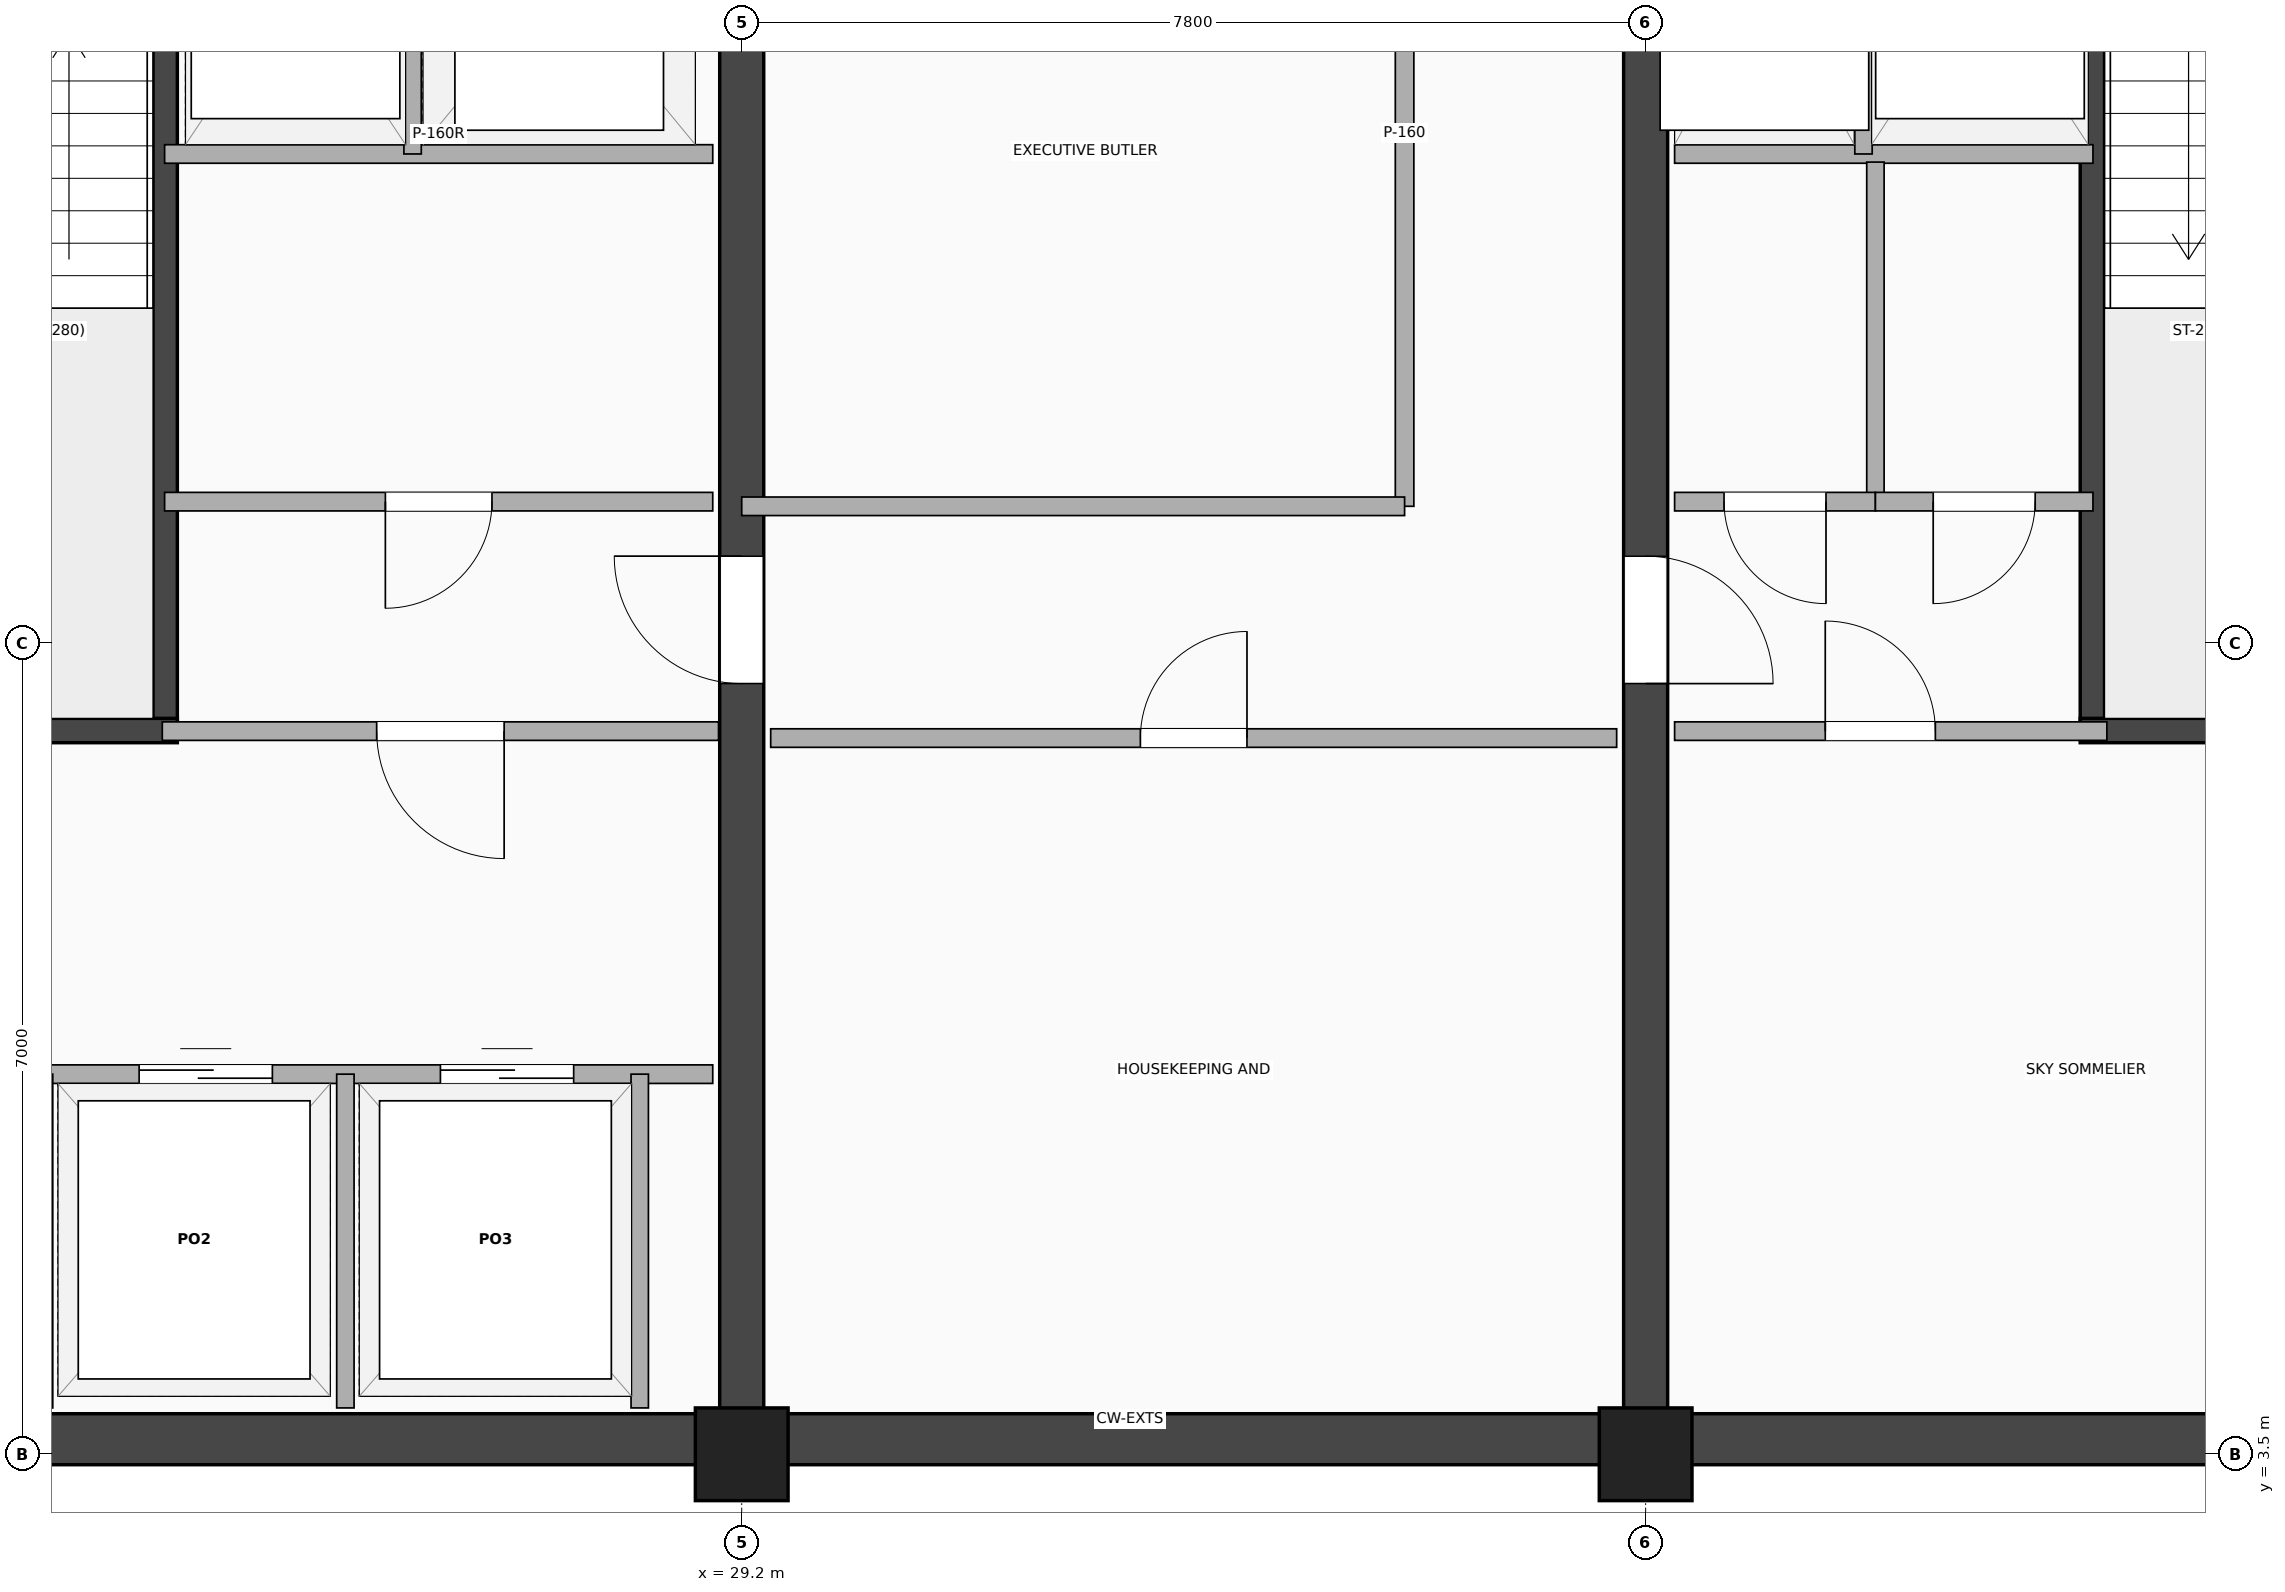
"""IFC4 building model, lengths in metres.
Left out: names, types, materials, properties, quantities, classifications, styles, units other than length and angle.
Written with IfcOpenShell. Run it as: python <this file> out.ifc"""

import sys

from ifc_helpers import new_model, si_unit, direction, frame, frame_2d, origin, origin_2d, place, context, subcontext, project, spatial, rectangle, extrude, element, fill, save


model = new_model("IFC4")
c1 = context("Model", 3, precision=1e-05, world=origin(), true_north=direction((0.0, 1.0)))
c2 = subcontext(c1, "Body", "Model", "MODEL_VIEW")
j1 = project(units=[si_unit("LENGTHUNIT", "METRE"), si_unit("PLANEANGLEUNIT", "RADIAN")], contexts=[c1])
p1 = place(None, origin())
s1 = spatial("IfcSite", under=j1, at=p1, CompositionType="ELEMENT")
p2 = place(p1, origin())
s2 = spatial("IfcBuilding", under=s1, at=p2, CompositionType="ELEMENT")
p3 = place(p2, frame((0.0, 0.0, 289.9)))
s3 = spatial("IfcBuildingStorey", under=s2, at=p3, CompositionType="ELEMENT", Elevation=289.9)
p4 = place(p3, frame((20.3, 3.63, 0.0), z_axis=(0.0, 0.0, 1.0), x_axis=(1.0, 0.0, 0.0)))
e1 = element("IfcWall", 1, at=p4, inside=s3, PredefinedType="SHEAR", context=c2, shape_type="SweptSolid", body=[
    extrude(rectangle(XDim=24.5, YDim=0.44, at=frame_2d((12.25, 0.0))), origin(), (0.0, 0.0, 1.0), 3.76),
])
p5 = place(p3, frame((29.2, 3.5, 0.0), z_axis=(0.0, 0.0, 1.0), x_axis=(0.0, 1.0, 0.0)))
e2 = element("IfcWall", 2, at=p5, inside=s3, PredefinedType="SHEAR", context=c2, shape_type="SweptSolid", body=[
    extrude(rectangle(XDim=14.95, YDim=0.38, at=frame_2d((7.475, 0.0))), origin(), (0.0, 0.0, 1.0), 3.76),
])
p6 = place(p5, frame((7.75, 0.0, 0.0), z_axis=(0.0, 0.0, 1.0), x_axis=(-1.0, 0.0, 0.0)))
e3 = element("IfcOpeningElement", 3, at=p6, cuts=e2, PredefinedType="OPENING", context=c2, shape_type="SweptSolid", body=[
    extrude(rectangle(XDim=1.1, YDim=2.15, at=frame_2d((0.55, 1.075))), frame((0.0, 0.2, 0.0), z_axis=(0.0, -1.0, 0.0), x_axis=(1.0, 0.0, 0.0)), (0.0, 0.0, 1.0), 0.4),
])
p7 = place(p3, frame((37.0, 3.5, 0.0), z_axis=(0.0, 0.0, 1.0), x_axis=(0.0, 1.0, 0.0)))
e4 = element("IfcWall", 4, at=p7, inside=s3, PredefinedType="SHEAR", context=c2, shape_type="SweptSolid", body=[
    extrude(rectangle(XDim=14.95, YDim=0.38, at=frame_2d((7.475, 0.0))), origin(), (0.0, 0.0, 1.0), 3.76),
])
p8 = place(p7, frame((6.65, 0.0, 0.0)))
e5 = element("IfcOpeningElement", 5, at=p8, cuts=e4, PredefinedType="OPENING", context=c2, shape_type="SweptSolid", body=[
    extrude(rectangle(XDim=1.1, YDim=2.15, at=frame_2d((0.55, 1.075))), frame((0.0, 0.2, 0.0), z_axis=(0.0, -1.0, 0.0), x_axis=(1.0, 0.0, 0.0)), (0.0, 0.0, 1.0), 0.4),
])
p9 = place(p3, frame((24.225, 9.745, 0.0), z_axis=(0.0, 0.0, 1.0), x_axis=(0.0, 1.0, 0.0)))
e6 = element("IfcWall", 6, at=p9, inside=s3, PredefinedType="SHEAR", context=c2, shape_type="SweptSolid", body=[
    extrude(rectangle(XDim=8.01, YDim=0.21, at=frame_2d((4.005, 0.0))), origin(), (0.0, 0.0, 1.0), 3.76),
])
p10 = place(p3, frame((20.67, 9.745, 0.0), z_axis=(0.0, 0.0, 1.0), x_axis=(1.0, 0.0, 0.0)))
e7 = element("IfcWall", 7, at=p10, inside=s3, PredefinedType="SHEAR", context=c2, shape_type="SweptSolid", body=[
    extrude(rectangle(XDim=3.66, YDim=0.21, at=frame_2d((1.83, 0.0))), origin(), (0.0, 0.0, 1.0), 3.76),
])
p11 = place(p3, frame((40.855, 9.745, 0.0), z_axis=(0.0, 0.0, 1.0), x_axis=(0.0, 1.0, 0.0)))
e8 = element("IfcWall", 8, at=p11, inside=s3, PredefinedType="SHEAR", context=c2, shape_type="SweptSolid", body=[
    extrude(rectangle(XDim=8.01, YDim=0.21, at=frame_2d((4.005, 0.0))), origin(), (0.0, 0.0, 1.0), 3.76),
])
p12 = place(p3, frame((40.75, 9.745, 0.0), z_axis=(0.0, 0.0, 1.0), x_axis=(1.0, 0.0, 0.0)))
e9 = element("IfcWall", 9, at=p12, inside=s3, PredefinedType="SHEAR", context=c2, shape_type="SweptSolid", body=[
    extrude(rectangle(XDim=3.66, YDim=0.21, at=frame_2d((1.83, 0.0))), origin(), (0.0, 0.0, 1.0), 3.76),
])
for number, where, z_axis, x_axis in (
    (10, (29.2, 3.5, -0.24), (0.0, 0.0, 1.0), (1.0, 0.0, 0.0)),
    (11, (37.0, 3.5, -0.24), (0.0, 0.0, 1.0), (1.0, 0.0, 0.0)),
):
    element("IfcColumn", number, at=place(p3, frame(where, z_axis=z_axis, x_axis=x_axis)), inside=s3, PredefinedType="COLUMN", context=c2, shape_type="SweptSolid", body=[
        extrude(rectangle(XDim=0.8, YDim=0.8, at=origin_2d()), origin(), (0.0, 0.0, 1.0), 4.0),
    ])
p13 = place(p3, frame((24.22, 14.72, 0.0), z_axis=(0.0, 0.0, 1.0), x_axis=(1.0, 0.0, 0.0)))
e12 = element("IfcWall", 12, at=p13, inside=s3, PredefinedType="PARTITIONING", context=c2, shape_type="SweptSolid", body=[
    extrude(rectangle(XDim=4.73, YDim=0.16, at=frame_2d((2.365, 0.0))), origin(), (0.0, 0.0, 1.0), 3.76),
])
p14 = place(p3, frame((26.36, 14.72, 0.0), z_axis=(0.0, 0.0, 1.0), x_axis=(0.0, 1.0, 0.0)))
e13 = element("IfcWall", 13, at=p14, inside=s3, PredefinedType="PARTITIONING", context=c2, shape_type="SweptSolid", body=[
    extrude(rectangle(XDim=3.04, YDim=0.15, at=frame_2d((1.52, 0.0))), origin(), (0.0, 0.0, 1.0), 3.76),
])
p15 = place(p3, frame((37.25, 14.72, 0.0), z_axis=(0.0, 0.0, 1.0), x_axis=(1.0, 0.0, 0.0)))
e14 = element("IfcWall", 14, at=p15, inside=s3, PredefinedType="PARTITIONING", context=c2, shape_type="SweptSolid", body=[
    extrude(rectangle(XDim=3.61, YDim=0.16, at=frame_2d((1.805, 0.0))), origin(), (0.0, 0.0, 1.0), 3.76),
])
p16 = place(p3, frame((38.88, 14.72, 0.0), z_axis=(0.0, 0.0, 1.0), x_axis=(0.0, 1.0, 0.0)))
e15 = element("IfcWall", 15, at=p16, inside=s3, PredefinedType="PARTITIONING", context=c2, shape_type="SweptSolid", body=[
    extrude(rectangle(XDim=3.04, YDim=0.15, at=frame_2d((1.52, 0.0))), origin(), (0.0, 0.0, 1.0), 3.76),
])
p17 = place(p3, frame((24.22, 11.72, 0.0), z_axis=(0.0, 0.0, 1.0), x_axis=(1.0, 0.0, 0.0)))
e16 = element("IfcWall", 16, at=p17, inside=s3, PredefinedType="PARTITIONING", context=c2, shape_type="SweptSolid", body=[
    extrude(rectangle(XDim=4.73, YDim=0.16, at=frame_2d((2.365, 0.0))), origin(), (0.0, 0.0, 1.0), 3.76),
])
p18 = place(p17, frame((1.905, 0.0, 0.0)))
e17 = element("IfcOpeningElement", 17, at=p18, cuts=e16, PredefinedType="OPENING", context=c2, shape_type="SweptSolid", body=[
    extrude(rectangle(XDim=0.92, YDim=2.08, at=frame_2d((0.46, 1.04))), frame((0.0, 0.09, 0.0), z_axis=(0.0, -1.0, 0.0), x_axis=(1.0, 0.0, 0.0)), (0.0, 0.0, 1.0), 0.18),
])
p19 = place(p3, frame((38.983, 11.72, 0.0), z_axis=(0.0, 0.0, 1.0), x_axis=(0.0, 1.0, 0.0)))
e18 = element("IfcWall", 18, at=p19, inside=s3, PredefinedType="PARTITIONING", context=c2, shape_type="SweptSolid", body=[
    extrude(rectangle(XDim=2.93, YDim=0.15, at=frame_2d((1.465, 0.0))), origin(), (0.0, 0.0, 1.0), 3.76),
])
p20 = place(p3, frame((37.25, 11.72, 0.0), z_axis=(0.0, 0.0, 1.0), x_axis=(1.0, 0.0, 0.0)))
e19 = element("IfcWall", 19, at=p20, inside=s3, PredefinedType="PARTITIONING", context=c2, shape_type="SweptSolid", body=[
    extrude(rectangle(XDim=1.733, YDim=0.16, at=frame_2d((0.866, 0.0))), origin(), (0.0, 0.0, 1.0), 3.76),
])
p21 = place(p20, frame((0.427, 0.0, 0.0)))
e20 = element("IfcOpeningElement", 20, at=p21, cuts=e19, PredefinedType="OPENING", context=c2, shape_type="SweptSolid", body=[
    extrude(rectangle(XDim=0.88, YDim=2.08, at=frame_2d((0.44, 1.04))), frame((0.0, 0.09, 0.0), z_axis=(0.0, -1.0, 0.0), x_axis=(1.0, 0.0, 0.0)), (0.0, 0.0, 1.0), 0.18),
])
p22 = place(p3, frame((38.983, 11.72, 0.0), z_axis=(0.0, 0.0, 1.0), x_axis=(1.0, 0.0, 0.0)))
e21 = element("IfcWall", 21, at=p22, inside=s3, PredefinedType="PARTITIONING", context=c2, shape_type="SweptSolid", body=[
    extrude(rectangle(XDim=1.877, YDim=0.16, at=frame_2d((0.938, 0.0))), origin(), (0.0, 0.0, 1.0), 3.76),
])
p23 = place(p22, frame((0.499, 0.0, 0.0)))
e22 = element("IfcOpeningElement", 22, at=p23, cuts=e21, PredefinedType="OPENING", context=c2, shape_type="SweptSolid", body=[
    extrude(rectangle(XDim=0.88, YDim=2.08, at=frame_2d((0.44, 1.04))), frame((0.0, 0.09, 0.0), z_axis=(0.0, -1.0, 0.0), x_axis=(1.0, 0.0, 0.0)), (0.0, 0.0, 1.0), 0.18),
])
p24 = place(p3, frame((20.65, 6.78, 0.0), z_axis=(0.0, 0.0, 1.0), x_axis=(1.0, 0.0, 0.0)))
e23 = element("IfcWall", 23, at=p24, inside=s3, PredefinedType="PARTITIONING", context=c2, shape_type="SweptSolid", body=[
    extrude(rectangle(XDim=8.3, YDim=0.16, at=frame_2d((4.15, 0.0))), origin(), (0.0, 0.0, 1.0), 3.05),
])
p25 = place(p24, frame((0.75, 0.0, 0.0)))
e24 = element("IfcOpeningElement", 24, at=p25, cuts=e23, PredefinedType="OPENING", context=c2, shape_type="SweptSolid", body=[
    extrude(rectangle(XDim=1.15, YDim=2.2, at=frame_2d((0.575, 1.1))), frame((0.0, 0.09, 0.0), z_axis=(0.0, -1.0, 0.0), x_axis=(1.0, 0.0, 0.0)), (0.0, 0.0, 1.0), 0.18),
])
p26 = place(p24, frame((3.35, 0.0, 0.0)))
e25 = element("IfcOpeningElement", 25, at=p26, cuts=e23, PredefinedType="OPENING", context=c2, shape_type="SweptSolid", body=[
    extrude(rectangle(XDim=1.15, YDim=2.2, at=frame_2d((0.575, 1.1))), frame((0.0, 0.09, 0.0), z_axis=(0.0, -1.0, 0.0), x_axis=(1.0, 0.0, 0.0)), (0.0, 0.0, 1.0), 0.18),
])
p27 = place(p24, frame((5.95, 0.0, 0.0)))
e26 = element("IfcOpeningElement", 26, at=p27, cuts=e23, PredefinedType="OPENING", context=c2, shape_type="SweptSolid", body=[
    extrude(rectangle(XDim=1.15, YDim=2.2, at=frame_2d((0.575, 1.1))), frame((0.0, 0.09, 0.0), z_axis=(0.0, -1.0, 0.0), x_axis=(1.0, 0.0, 0.0)), (0.0, 0.0, 1.0), 0.18),
])
for number, where, z_axis, x_axis in (
    (27, (23.18, 3.9, 0.0), (0.0, 0.0, 1.0), (0.0, 1.0, 0.0)),
    (28, (25.78, 3.9, 0.0), (0.0, 0.0, 1.0), (0.0, 1.0, 0.0)),
    (29, (28.32, 3.9, 0.0), (0.0, 0.0, 1.0), (0.0, 1.0, 0.0)),
):
    element("IfcWall", number, at=place(p3, frame(where, z_axis=z_axis, x_axis=x_axis)), inside=s3, PredefinedType="PARTITIONING", context=c2, shape_type="SweptSolid", body=[
        extrude(rectangle(XDim=2.88, YDim=0.15, at=frame_2d((1.44, 0.0))), origin(), (0.0, 0.0, 1.0), 3.76),
    ])
p28 = place(p3, frame((24.2, 9.74, 0.0), z_axis=(0.0, 0.0, 1.0), x_axis=(1.0, 0.0, 0.0)))
e30 = element("IfcWall", 30, at=p28, inside=s3, PredefinedType="PARTITIONING", context=c2, shape_type="SweptSolid", body=[
    extrude(rectangle(XDim=4.8, YDim=0.16, at=frame_2d((2.4, 0.0))), origin(), (0.0, 0.0, 1.0), 3.76),
])
p29 = place(p28, frame((1.85, 0.0, 0.0)))
e31 = element("IfcOpeningElement", 31, at=p29, cuts=e30, PredefinedType="OPENING", context=c2, shape_type="SweptSolid", body=[
    extrude(rectangle(XDim=1.1, YDim=2.15, at=frame_2d((0.55, 1.075))), frame((0.0, 0.09, 0.0), z_axis=(0.0, -1.0, 0.0), x_axis=(1.0, 0.0, 0.0)), (0.0, 0.0, 1.0), 0.18),
])
p30 = place(p3, frame((37.25, 9.74, 0.0), z_axis=(0.0, 0.0, 1.0), x_axis=(1.0, 0.0, 0.0)))
e32 = element("IfcWall", 32, at=p30, inside=s3, PredefinedType="PARTITIONING", context=c2, shape_type="SweptSolid", body=[
    extrude(rectangle(XDim=3.73, YDim=0.16, at=frame_2d((1.865, 0.0))), origin(), (0.0, 0.0, 1.0), 3.76),
])
p31 = place(p30, frame((2.25, 0.0, 0.0), z_axis=(0.0, 0.0, 1.0), x_axis=(-1.0, 0.0, 0.0)))
e33 = element("IfcOpeningElement", 33, at=p31, cuts=e32, PredefinedType="OPENING", context=c2, shape_type="SweptSolid", body=[
    extrude(rectangle(XDim=0.95, YDim=2.15, at=frame_2d((0.475, 1.075))), frame((0.0, 0.09, 0.0), z_axis=(0.0, -1.0, 0.0), x_axis=(1.0, 0.0, 0.0)), (0.0, 0.0, 1.0), 0.18),
])
p32 = place(p3, frame((34.92, 11.68, 0.0), z_axis=(0.0, 0.0, 1.0), x_axis=(0.0, 1.0, 0.0)))
e34 = element("IfcWall", 34, at=p32, inside=s3, PredefinedType="PARTITIONING", context=c2, shape_type="SweptSolid", body=[
    extrude(rectangle(XDim=6.1, YDim=0.16, at=frame_2d((3.05, 0.0))), origin(), (0.0, 0.0, 1.0), 3.76),
])
p33 = place(p3, frame((29.45, 9.68, 0.0), z_axis=(0.0, 0.0, 1.0), x_axis=(1.0, 0.0, 0.0)))
e35 = element("IfcWall", 35, at=p33, inside=s3, PredefinedType="PARTITIONING", context=c2, shape_type="SweptSolid", body=[
    extrude(rectangle(XDim=7.3, YDim=0.16, at=frame_2d((3.65, 0.0))), origin(), (0.0, 0.0, 1.0), 3.76),
])
p34 = place(p33, frame((4.11, 0.0, 0.0), z_axis=(0.0, 0.0, 1.0), x_axis=(-1.0, 0.0, 0.0)))
e36 = element("IfcOpeningElement", 36, at=p34, cuts=e35, PredefinedType="OPENING", context=c2, shape_type="SweptSolid", body=[
    extrude(rectangle(XDim=0.92, YDim=2.08, at=frame_2d((0.46, 1.04))), frame((0.0, 0.09, 0.0), z_axis=(0.0, -1.0, 0.0), x_axis=(1.0, 0.0, 0.0)), (0.0, 0.0, 1.0), 0.18),
])
p35 = place(p3, frame((29.2, 11.68, 0.0), z_axis=(0.0, 0.0, 1.0), x_axis=(1.0, 0.0, 0.0)))
e37 = element("IfcWall", 37, at=p35, inside=s3, PredefinedType="PARTITIONING", context=c2, shape_type="SweptSolid", body=[
    extrude(rectangle(XDim=5.72, YDim=0.16, at=frame_2d((2.86, 0.0))), origin(), (0.0, 0.0, 1.0), 3.76),
])
p36 = place(p6, origin())
e38 = element("IfcDoor", 38, at=p36, inside=s3, OperationType="SINGLE_SWING_RIGHT", PredefinedType="DOOR", context=c2, shape_type="SweptSolid", body=[
    extrude(rectangle(XDim=1.1, YDim=2.15, at=frame_2d((0.55, 1.075))), frame((0.0, 0.025, 0.0), z_axis=(0.0, -1.0, 0.0), x_axis=(1.0, 0.0, 0.0)), (0.0, 0.0, 1.0), 0.05),
])
fill(e3, e38)
p37 = place(p8, origin())
e39 = element("IfcDoor", 39, at=p37, inside=s3, OperationType="SINGLE_SWING_LEFT", PredefinedType="DOOR", context=c2, shape_type="SweptSolid", body=[
    extrude(rectangle(XDim=1.1, YDim=2.15, at=frame_2d((0.55, 1.075))), frame((0.0, 0.025, 0.0), z_axis=(0.0, -1.0, 0.0), x_axis=(1.0, 0.0, 0.0)), (0.0, 0.0, 1.0), 0.05),
])
fill(e5, e39)
p38 = place(p18, origin())
e40 = element("IfcDoor", 40, at=p38, inside=s3, OperationType="SINGLE_SWING_LEFT", PredefinedType="DOOR", context=c2, shape_type="SweptSolid", body=[
    extrude(rectangle(XDim=0.92, YDim=2.08, at=frame_2d((0.46, 1.04))), frame((0.0, 0.025, 0.0), z_axis=(0.0, -1.0, 0.0), x_axis=(1.0, 0.0, 0.0)), (0.0, 0.0, 1.0), 0.05),
])
fill(e17, e40)
p39 = place(p21, origin())
e41 = element("IfcDoor", 41, at=p39, inside=s3, OperationType="SINGLE_SWING_RIGHT", PredefinedType="DOOR", context=c2, shape_type="SweptSolid", body=[
    extrude(rectangle(XDim=0.88, YDim=2.08, at=frame_2d((0.44, 1.04))), frame((0.0, 0.025, 0.0), z_axis=(0.0, -1.0, 0.0), x_axis=(1.0, 0.0, 0.0)), (0.0, 0.0, 1.0), 0.05),
])
fill(e20, e41)
p40 = place(p23, origin())
e42 = element("IfcDoor", 42, at=p40, inside=s3, OperationType="SINGLE_SWING_LEFT", PredefinedType="DOOR", context=c2, shape_type="SweptSolid", body=[
    extrude(rectangle(XDim=0.88, YDim=2.08, at=frame_2d((0.44, 1.04))), frame((0.0, 0.025, 0.0), z_axis=(0.0, -1.0, 0.0), x_axis=(1.0, 0.0, 0.0)), (0.0, 0.0, 1.0), 0.05),
])
fill(e22, e42)
p41 = place(p26, origin())
e43 = element("IfcDoor", 43, at=p41, inside=s3, OperationType="DOUBLE_DOOR_SLIDING", PredefinedType="DOOR", context=c2, shape_type="SweptSolid", body=[
    extrude(rectangle(XDim=1.15, YDim=2.2, at=frame_2d((0.575, 1.1))), frame((0.0, 0.025, 0.0), z_axis=(0.0, -1.0, 0.0), x_axis=(1.0, 0.0, 0.0)), (0.0, 0.0, 1.0), 0.05),
])
fill(e25, e43)
p42 = place(p27, origin())
e44 = element("IfcDoor", 44, at=p42, inside=s3, OperationType="DOUBLE_DOOR_SLIDING", PredefinedType="DOOR", context=c2, shape_type="SweptSolid", body=[
    extrude(rectangle(XDim=1.15, YDim=2.2, at=frame_2d((0.575, 1.1))), frame((0.0, 0.025, 0.0), z_axis=(0.0, -1.0, 0.0), x_axis=(1.0, 0.0, 0.0)), (0.0, 0.0, 1.0), 0.05),
])
fill(e26, e44)
p43 = place(p29, origin())
e45 = element("IfcDoor", 45, at=p43, inside=s3, OperationType="SINGLE_SWING_RIGHT", PredefinedType="DOOR", context=c2, shape_type="SweptSolid", body=[
    extrude(rectangle(XDim=1.1, YDim=2.15, at=frame_2d((0.55, 1.075))), frame((0.0, 0.025, 0.0), z_axis=(0.0, -1.0, 0.0), x_axis=(1.0, 0.0, 0.0)), (0.0, 0.0, 1.0), 0.05),
])
fill(e31, e45)
p44 = place(p31, origin())
e46 = element("IfcDoor", 46, at=p44, inside=s3, OperationType="SINGLE_SWING_LEFT", PredefinedType="DOOR", context=c2, shape_type="SweptSolid", body=[
    extrude(rectangle(XDim=0.95, YDim=2.15, at=frame_2d((0.475, 1.075))), frame((0.0, 0.025, 0.0), z_axis=(0.0, -1.0, 0.0), x_axis=(1.0, 0.0, 0.0)), (0.0, 0.0, 1.0), 0.05),
])
fill(e33, e46)
p45 = place(p34, origin())
e47 = element("IfcDoor", 47, at=p45, inside=s3, OperationType="SINGLE_SWING_RIGHT", PredefinedType="DOOR", context=c2, shape_type="SweptSolid", body=[
    extrude(rectangle(XDim=0.92, YDim=2.08, at=frame_2d((0.46, 1.04))), frame((0.0, 0.025, 0.0), z_axis=(0.0, -1.0, 0.0), x_axis=(1.0, 0.0, 0.0)), (0.0, 0.0, 1.0), 0.05),
])
fill(e36, e47)
save(model, sys.argv[1])
